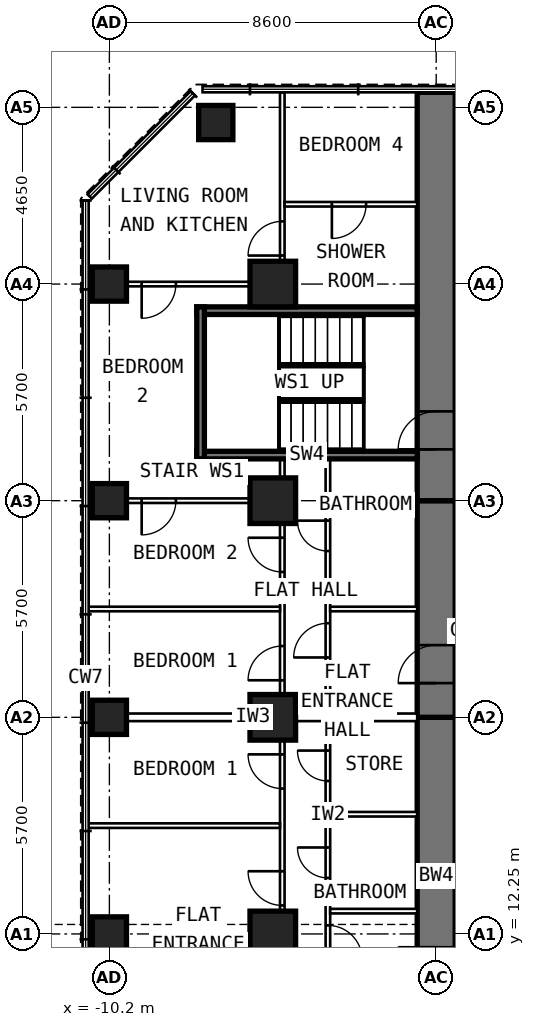
"""IFC4 building model, lengths in metres.
Left out: names, types, materials, properties, quantities, classifications, styles, units other than length and angle.
Written with IfcOpenShell. Run it as: python <this file> out.ifc"""

import sys

from ifc_helpers import new_model, si_unit, direction, frame, frame_2d, origin, origin_2d, place, context, subcontext, project, spatial, rectangle, extrude, element, fill, save


model = new_model("IFC4")
c1 = context("Model", 3, precision=1e-05, world=origin(), true_north=direction((0.0, 1.0)))
c2 = subcontext(c1, "Body", "Model", "MODEL_VIEW")
j1 = project(units=[si_unit("LENGTHUNIT", "METRE"), si_unit("PLANEANGLEUNIT", "RADIAN")], contexts=[c1])
p1 = place(None, origin())
s1 = spatial("IfcSite", under=j1, at=p1, CompositionType="ELEMENT")
p2 = place(p1, origin())
s2 = spatial("IfcBuilding", under=s1, at=p2, CompositionType="ELEMENT")
p3 = place(p2, frame((0.0, 0.0, 75.4)))
s3 = spatial("IfcBuildingStorey", under=s2, at=p3, CompositionType="ELEMENT", Elevation=75.4)
for number, where, z_axis, x_axis in (
    (1, (-10.2, 12.25, 0.0), (0.0, 0.0, 1.0), (0.0, 1.0, 0.0)),
    (2, (-10.2, 17.95, 0.0), (0.0, 0.0, 1.0), (0.0, 1.0, 0.0)),
    (3, (-10.2, 23.65, 0.0), (0.0, 0.0, 1.0), (0.0, 1.0, 0.0)),
    (4, (-10.2, 29.35, 0.0), (0.0, 0.0, 1.0), (0.0, 1.0, 0.0)),
    (5, (-7.4, 33.6, 0.0), (0.0, 0.0, 1.0), (0.0, 1.0, 0.0)),
):
    element("IfcColumn", number, at=place(p3, frame(where, z_axis=z_axis, x_axis=x_axis)), inside=s3, PredefinedType="COLUMN", context=c2, shape_type="SweptSolid", body=[
        extrude(rectangle(XDim=0.9, YDim=0.9, at=origin_2d()), origin(), (0.0, 0.0, 1.0), 5.4),
    ])
for number, where, z_axis, x_axis in (
    (6, (-5.9, 12.25, 0.0), (0.0, 0.0, 1.0), (0.0, 1.0, 0.0)),
    (7, (-5.9, 17.95, 0.0), (0.0, 0.0, 1.0), (0.0, 1.0, 0.0)),
    (8, (-5.9, 23.65, 0.0), (0.0, 0.0, 1.0), (0.0, 1.0, 0.0)),
    (9, (-5.9, 29.35, 0.0), (0.0, 0.0, 1.0), (0.0, 1.0, 0.0)),
):
    element("IfcColumn", number, at=place(p3, frame(where, z_axis=z_axis, x_axis=x_axis)), inside=s3, PredefinedType="COLUMN", context=c2, shape_type="SweptSolid", body=[
        extrude(rectangle(XDim=1.2, YDim=1.2, at=origin_2d()), origin(), (0.0, 0.0, 1.0), 5.4),
    ])
p4 = place(p3, frame((-1.6, 9.6, 0.0), z_axis=(0.0, 0.0, 1.0), x_axis=(0.0, 1.0, 0.0)))
e10 = element("IfcWall", 10, at=p4, inside=s3, PredefinedType="SHEAR", context=c2, shape_type="SweptSolid", body=[
    extrude(rectangle(XDim=8.35, YDim=1.0, at=frame_2d((4.175, 0.0))), origin(), (0.0, 0.0, 1.0), 5.4),
])
p5 = place(p4, frame((1.3, 0.0, 0.0)))
e11 = element("IfcOpeningElement", 11, at=p5, cuts=e10, PredefinedType="OPENING", context=c2, shape_type="SweptSolid", body=[
    extrude(rectangle(XDim=1.0, YDim=2.1, at=frame_2d((0.5, 1.05))), frame((0.0, 0.512, 0.0), z_axis=(0.0, -1.0, 0.0), x_axis=(1.0, 0.0, 0.0)), (0.0, 0.0, 1.0), 1.024),
])
p6 = place(p3, frame((-1.6, 17.95, 0.0), z_axis=(0.0, 0.0, 1.0), x_axis=(0.0, 1.0, 0.0)))
e12 = element("IfcWall", 12, at=p6, inside=s3, PredefinedType="SHEAR", context=c2, shape_type="SweptSolid", body=[
    extrude(rectangle(XDim=5.7, YDim=1.0, at=frame_2d((2.85, 0.0))), origin(), (0.0, 0.0, 1.0), 5.4),
])
p7 = place(p6, frame((0.9, 0.0, 0.0)))
e13 = element("IfcOpeningElement", 13, at=p7, cuts=e12, PredefinedType="OPENING", context=c2, shape_type="SweptSolid", body=[
    extrude(rectangle(XDim=1.0, YDim=2.1, at=frame_2d((0.5, 1.05))), frame((0.0, 0.512, 0.0), z_axis=(0.0, -1.0, 0.0), x_axis=(1.0, 0.0, 0.0)), (0.0, 0.0, 1.0), 1.024),
])
p8 = place(p3, frame((-1.6, 23.65, 0.0), z_axis=(0.0, 0.0, 1.0), x_axis=(0.0, 1.0, 0.0)))
e14 = element("IfcWall", 14, at=p8, inside=s3, PredefinedType="SHEAR", context=c2, shape_type="SweptSolid", body=[
    extrude(rectangle(XDim=10.745, YDim=1.0, at=frame_2d((5.373, 0.0))), origin(), (0.0, 0.0, 1.0), 5.4),
])
p9 = place(p8, frame((1.35, 0.0, 0.0)))
e15 = element("IfcOpeningElement", 15, at=p9, cuts=e14, PredefinedType="OPENING", context=c2, shape_type="SweptSolid", body=[
    extrude(rectangle(XDim=1.0, YDim=2.1, at=frame_2d((0.5, 1.05))), frame((0.0, 0.512, 0.0), z_axis=(0.0, -1.0, 0.0), x_axis=(1.0, 0.0, 0.0)), (0.0, 0.0, 1.0), 1.024),
])
p10 = place(p3, frame((-4.45, 10.1, 0.0), z_axis=(0.0, 0.0, 1.0), x_axis=(0.0, 1.0, 0.0)))
e16 = element("IfcWall", 16, at=p10, inside=s3, PredefinedType="PARTITIONING", context=c2, shape_type="SweptSolid", body=[
    extrude(rectangle(XDim=7.75, YDim=0.12, at=frame_2d((3.875, 0.0))), origin(), (0.0, 0.0, 1.0), 5.15),
])
p11 = place(p10, frame((1.475, 0.0, 0.0)))
e17 = element("IfcOpeningElement", 17, at=p11, cuts=e16, PredefinedType="OPENING", context=c2, shape_type="SweptSolid", body=[
    extrude(rectangle(XDim=0.9, YDim=2.1, at=frame_2d((0.45, 1.05))), frame((0.0, 0.072, 0.0), z_axis=(0.0, -1.0, 0.0), x_axis=(1.0, 0.0, 0.0)), (0.0, 0.0, 1.0), 0.144),
])
p12 = place(p10, frame((3.625, 0.0, 0.0)))
e18 = element("IfcOpeningElement", 18, at=p12, cuts=e16, PredefinedType="OPENING", context=c2, shape_type="SweptSolid", body=[
    extrude(rectangle(XDim=0.8, YDim=2.1, at=frame_2d((0.4, 1.05))), frame((0.0, 0.072, 0.0), z_axis=(0.0, -1.0, 0.0), x_axis=(1.0, 0.0, 0.0)), (0.0, 0.0, 1.0), 0.144),
])
p13 = place(p10, frame((6.175, 0.0, 0.0)))
e19 = element("IfcOpeningElement", 19, at=p13, cuts=e16, PredefinedType="OPENING", context=c2, shape_type="SweptSolid", body=[
    extrude(rectangle(XDim=0.8, YDim=2.1, at=frame_2d((0.4, 1.05))), frame((0.0, 0.072, 0.0), z_axis=(0.0, -1.0, 0.0), x_axis=(1.0, 0.0, 0.0)), (0.0, 0.0, 1.0), 0.144),
])
p14 = place(p3, frame((-5.65, 9.6, 0.0), z_axis=(0.0, 0.0, 1.0), x_axis=(0.0, 1.0, 0.0)))
e20 = element("IfcWall", 20, at=p14, inside=s3, PredefinedType="PARTITIONING", context=c2, shape_type="SweptSolid", body=[
    extrude(rectangle(XDim=8.1, YDim=0.12, at=frame_2d((4.05, 0.0))), origin(), (0.0, 0.0, 1.0), 5.15),
])
p15 = place(p14, frame((3.4, 0.0, 0.0)))
e21 = element("IfcOpeningElement", 21, at=p15, cuts=e20, PredefinedType="OPENING", context=c2, shape_type="SweptSolid", body=[
    extrude(rectangle(XDim=0.9, YDim=2.1, at=frame_2d((0.45, 1.05))), frame((0.0, 0.072, 0.0), z_axis=(0.0, -1.0, 0.0), x_axis=(1.0, 0.0, 0.0)), (0.0, 0.0, 1.0), 0.144),
])
p16 = place(p14, frame((6.475, 0.0, 0.0)))
e22 = element("IfcOpeningElement", 22, at=p16, cuts=e20, PredefinedType="OPENING", context=c2, shape_type="SweptSolid", body=[
    extrude(rectangle(XDim=0.9, YDim=2.1, at=frame_2d((0.45, 1.05))), frame((0.0, 0.072, 0.0), z_axis=(0.0, -1.0, 0.0), x_axis=(1.0, 0.0, 0.0)), (0.0, 0.0, 1.0), 0.144),
])
p17 = place(p3, frame((-5.71, 15.1, 0.0), z_axis=(0.0, 0.0, 1.0), x_axis=(-1.0, 0.0, 0.0)))
e23 = element("IfcWall", 23, at=p17, inside=s3, PredefinedType="PARTITIONING", context=c2, shape_type="SweptSolid", body=[
    extrude(rectangle(XDim=5.035, YDim=0.12, at=frame_2d((2.518, 0.0))), origin(), (0.0, 0.0, 1.0), 5.15),
])
for number, where, z_axis, x_axis in (
    (24, (-2.1, 12.85, 0.0), (0.0, 0.0, 1.0), (-1.0, 0.0, 0.0)),
    (25, (-2.1, 15.4, 0.0), (0.0, 0.0, 1.0), (-1.0, 0.0, 0.0)),
):
    element("IfcWall", number, at=place(p3, frame(where, z_axis=z_axis, x_axis=x_axis)), inside=s3, PredefinedType="PARTITIONING", context=c2, shape_type="SweptSolid", body=[
        extrude(rectangle(XDim=2.29, YDim=0.12, at=frame_2d((1.145, 0.0))), origin(), (0.0, 0.0, 1.0), 5.15),
    ])
p18 = place(p3, frame((-4.45, 18.05, 0.0), z_axis=(0.0, 0.0, 1.0), x_axis=(0.0, 1.0, 0.0)))
e26 = element("IfcWall", 26, at=p18, inside=s3, PredefinedType="PARTITIONING", context=c2, shape_type="SweptSolid", body=[
    extrude(rectangle(XDim=6.7, YDim=0.12, at=frame_2d((3.35, 0.0))), origin(), (0.0, 0.0, 1.0), 5.15),
])
p19 = place(p18, frame((1.475, 0.0, 0.0)))
e27 = element("IfcOpeningElement", 27, at=p19, cuts=e26, PredefinedType="OPENING", context=c2, shape_type="SweptSolid", body=[
    extrude(rectangle(XDim=0.9, YDim=2.1, at=frame_2d((0.45, 1.05))), frame((0.0, 0.072, 0.0), z_axis=(0.0, -1.0, 0.0), x_axis=(1.0, 0.0, 0.0)), (0.0, 0.0, 1.0), 0.144),
])
p20 = place(p18, frame((4.275, 0.0, 0.0)))
e28 = element("IfcOpeningElement", 28, at=p20, cuts=e26, PredefinedType="OPENING", context=c2, shape_type="SweptSolid", body=[
    extrude(rectangle(XDim=0.8, YDim=2.1, at=frame_2d((0.4, 1.05))), frame((0.0, 0.072, 0.0), z_axis=(0.0, -1.0, 0.0), x_axis=(1.0, 0.0, 0.0)), (0.0, 0.0, 1.0), 0.144),
])
p21 = place(p3, frame((-5.65, 18.05, 0.0), z_axis=(0.0, 0.0, 1.0), x_axis=(0.0, 1.0, 0.0)))
e29 = element("IfcWall", 29, at=p21, inside=s3, PredefinedType="PARTITIONING", context=c2, shape_type="SweptSolid", body=[
    extrude(rectangle(XDim=6.7, YDim=0.12, at=frame_2d((3.35, 0.0))), origin(), (0.0, 0.0, 1.0), 5.15),
])
p22 = place(p21, frame((0.875, 0.0, 0.0)))
e30 = element("IfcOpeningElement", 30, at=p22, cuts=e29, PredefinedType="OPENING", context=c2, shape_type="SweptSolid", body=[
    extrude(rectangle(XDim=0.9, YDim=2.1, at=frame_2d((0.45, 1.05))), frame((0.0, 0.072, 0.0), z_axis=(0.0, -1.0, 0.0), x_axis=(1.0, 0.0, 0.0)), (0.0, 0.0, 1.0), 0.144),
])
p23 = place(p21, frame((3.725, 0.0, 0.0)))
e31 = element("IfcOpeningElement", 31, at=p23, cuts=e29, PredefinedType="OPENING", context=c2, shape_type="SweptSolid", body=[
    extrude(rectangle(XDim=0.9, YDim=2.1, at=frame_2d((0.45, 1.05))), frame((0.0, 0.072, 0.0), z_axis=(0.0, -1.0, 0.0), x_axis=(1.0, 0.0, 0.0)), (0.0, 0.0, 1.0), 0.144),
])
p24 = place(p3, frame((-5.71, 20.8, 0.0), z_axis=(0.0, 0.0, 1.0), x_axis=(-1.0, 0.0, 0.0)))
e32 = element("IfcWall", 32, at=p24, inside=s3, PredefinedType="PARTITIONING", context=c2, shape_type="SweptSolid", body=[
    extrude(rectangle(XDim=5.035, YDim=0.12, at=frame_2d((2.518, 0.0))), origin(), (0.0, 0.0, 1.0), 5.15),
])
p25 = place(p3, frame((-2.1, 20.8, 0.0), z_axis=(0.0, 0.0, 1.0), x_axis=(-1.0, 0.0, 0.0)))
e33 = element("IfcWall", 33, at=p25, inside=s3, PredefinedType="PARTITIONING", context=c2, shape_type="SweptSolid", body=[
    extrude(rectangle(XDim=2.29, YDim=0.12, at=frame_2d((1.145, 0.0))), origin(), (0.0, 0.0, 1.0), 5.15),
])
p26 = place(p3, frame((-2.1, 17.95, 0.0), z_axis=(0.0, 0.0, 1.0), x_axis=(-1.0, 0.0, 0.0)))
e34 = element("IfcWall", 34, at=p26, inside=s3, PredefinedType="PARTITIONING", context=c2, shape_type="SweptSolid", body=[
    extrude(rectangle(XDim=8.645, YDim=0.2, at=frame_2d((4.323, 0.0))), origin(), (0.0, 0.0, 1.0), 4.25),
])
p27 = place(p3, frame((-5.71, 23.65, 0.0), z_axis=(0.0, 0.0, 1.0), x_axis=(-1.0, 0.0, 0.0)))
e35 = element("IfcWall", 35, at=p27, inside=s3, PredefinedType="PARTITIONING", context=c2, shape_type="SweptSolid", body=[
    extrude(rectangle(XDim=5.035, YDim=0.12, at=frame_2d((2.518, 0.0))), origin(), (0.0, 0.0, 1.0), 4.25),
])
p28 = place(p27, frame((2.74, 0.0, 0.0)))
e36 = element("IfcOpeningElement", 36, at=p28, cuts=e35, PredefinedType="OPENING", context=c2, shape_type="SweptSolid", body=[
    extrude(rectangle(XDim=0.9, YDim=2.1, at=frame_2d((0.45, 1.05))), frame((0.0, 0.072, 0.0), z_axis=(0.0, -1.0, 0.0), x_axis=(1.0, 0.0, 0.0)), (0.0, 0.0, 1.0), 0.144),
])
p29 = place(p3, frame((-5.71, 29.35, 0.0), z_axis=(0.0, 0.0, 1.0), x_axis=(-1.0, 0.0, 0.0)))
e37 = element("IfcWall", 37, at=p29, inside=s3, PredefinedType="PARTITIONING", context=c2, shape_type="SweptSolid", body=[
    extrude(rectangle(XDim=5.035, YDim=0.12, at=frame_2d((2.518, 0.0))), origin(), (0.0, 0.0, 1.0), 4.25),
])
p30 = place(p29, frame((2.74, 0.0, 0.0)))
e38 = element("IfcOpeningElement", 38, at=p30, cuts=e37, PredefinedType="OPENING", context=c2, shape_type="SweptSolid", body=[
    extrude(rectangle(XDim=0.9, YDim=2.1, at=frame_2d((0.45, 1.05))), frame((0.0, 0.072, 0.0), z_axis=(0.0, -1.0, 0.0), x_axis=(1.0, 0.0, 0.0)), (0.0, 0.0, 1.0), 0.144),
])
p31 = place(p3, frame((-5.65, 28.95, 0.0), z_axis=(0.0, 0.0, 1.0), x_axis=(0.0, 1.0, 0.0)))
e39 = element("IfcWall", 39, at=p31, inside=s3, PredefinedType="PARTITIONING", context=c2, shape_type="SweptSolid", body=[
    extrude(rectangle(XDim=5.445, YDim=0.12, at=frame_2d((2.723, 0.0))), origin(), (0.0, 0.0, 1.0), 5.15),
])
p32 = place(p31, frame((1.15, 0.0, 0.0)))
e40 = element("IfcOpeningElement", 40, at=p32, cuts=e39, PredefinedType="OPENING", context=c2, shape_type="SweptSolid", body=[
    extrude(rectangle(XDim=0.9, YDim=2.1, at=frame_2d((0.45, 1.05))), frame((0.0, 0.072, 0.0), z_axis=(0.0, -1.0, 0.0), x_axis=(1.0, 0.0, 0.0)), (0.0, 0.0, 1.0), 0.144),
])
p33 = place(p3, frame((-2.1, 31.45, 0.0), z_axis=(0.0, 0.0, 1.0), x_axis=(-1.0, 0.0, 0.0)))
e41 = element("IfcWall", 41, at=p33, inside=s3, PredefinedType="PARTITIONING", context=c2, shape_type="SweptSolid", body=[
    extrude(rectangle(XDim=3.49, YDim=0.12, at=frame_2d((1.745, 0.0))), origin(), (0.0, 0.0, 1.0), 5.15),
])
p34 = place(p33, frame((1.345, 0.0, 0.0)))
e42 = element("IfcOpeningElement", 42, at=p34, cuts=e41, PredefinedType="OPENING", context=c2, shape_type="SweptSolid", body=[
    extrude(rectangle(XDim=0.9, YDim=2.1, at=frame_2d((0.45, 1.05))), frame((0.0, 0.072, 0.0), z_axis=(0.0, -1.0, 0.0), x_axis=(1.0, 0.0, 0.0)), (0.0, 0.0, 1.0), 0.144),
])
for number, where, z_axis, x_axis in (
    (43, (-2.1, 24.85, 0.0), (0.0, 0.0, 1.0), (-1.0, 0.0, 0.0)),
    (44, (-2.1, 28.65, 0.0), (0.0, 0.0, 1.0), (-1.0, 0.0, 0.0)),
):
    element("IfcWall", number, at=place(p3, frame(where, z_axis=z_axis, x_axis=x_axis)), inside=s3, PredefinedType="SHEAR", context=c2, shape_type="SweptSolid", body=[
        extrude(rectangle(XDim=5.8, YDim=0.2, at=frame_2d((2.9, 0.0))), origin(), (0.0, 0.0, 1.0), 5.13),
    ])
p35 = place(p3, frame((-7.8, 24.75, 0.0), z_axis=(0.0, 0.0, 1.0), x_axis=(0.0, 1.0, 0.0)))
e45 = element("IfcWall", 45, at=p35, inside=s3, PredefinedType="SHEAR", context=c2, shape_type="SweptSolid", body=[
    extrude(rectangle(XDim=4.0, YDim=0.2, at=frame_2d((2.0, 0.0))), origin(), (0.0, 0.0, 1.0), 5.13),
])
p36 = place(p15, origin())
e46 = element("IfcDoor", 46, at=p36, inside=s3, OperationType="SINGLE_SWING_RIGHT", PredefinedType="DOOR", context=c2, shape_type="SweptSolid", body=[
    extrude(rectangle(XDim=0.9, YDim=2.1, at=frame_2d((0.45, 1.05))), frame((0.0, 0.025, 0.0), z_axis=(0.0, -1.0, 0.0), x_axis=(1.0, 0.0, 0.0)), (0.0, 0.0, 1.0), 0.05),
])
fill(e21, e46)
p37 = place(p16, origin())
e47 = element("IfcDoor", 47, at=p37, inside=s3, OperationType="SINGLE_SWING_RIGHT", PredefinedType="DOOR", context=c2, shape_type="SweptSolid", body=[
    extrude(rectangle(XDim=0.9, YDim=2.1, at=frame_2d((0.45, 1.05))), frame((0.0, 0.025, 0.0), z_axis=(0.0, -1.0, 0.0), x_axis=(1.0, 0.0, 0.0)), (0.0, 0.0, 1.0), 0.05),
])
fill(e22, e47)
p38 = place(p11, frame((0.9, 0.0, 0.0), z_axis=(0.0, 0.0, 1.0), x_axis=(-1.0, 0.0, 0.0)))
e48 = element("IfcDoor", 48, at=p38, inside=s3, OperationType="SINGLE_SWING_RIGHT", PredefinedType="DOOR", context=c2, shape_type="SweptSolid", body=[
    extrude(rectangle(XDim=0.9, YDim=2.1, at=frame_2d((0.45, 1.05))), frame((0.0, 0.025, 0.0), z_axis=(0.0, -1.0, 0.0), x_axis=(1.0, 0.0, 0.0)), (0.0, 0.0, 1.0), 0.05),
])
fill(e17, e48)
p39 = place(p12, origin())
e49 = element("IfcDoor", 49, at=p39, inside=s3, OperationType="SINGLE_SWING_RIGHT", PredefinedType="DOOR", context=c2, shape_type="SweptSolid", body=[
    extrude(rectangle(XDim=0.8, YDim=2.1, at=frame_2d((0.4, 1.05))), frame((0.0, 0.025, 0.0), z_axis=(0.0, -1.0, 0.0), x_axis=(1.0, 0.0, 0.0)), (0.0, 0.0, 1.0), 0.05),
])
fill(e18, e49)
p40 = place(p13, origin())
e50 = element("IfcDoor", 50, at=p40, inside=s3, OperationType="SINGLE_SWING_RIGHT", PredefinedType="DOOR", context=c2, shape_type="SweptSolid", body=[
    extrude(rectangle(XDim=0.8, YDim=2.1, at=frame_2d((0.4, 1.05))), frame((0.0, 0.025, 0.0), z_axis=(0.0, -1.0, 0.0), x_axis=(1.0, 0.0, 0.0)), (0.0, 0.0, 1.0), 0.05),
])
fill(e19, e50)
p41 = place(p7, origin())
e51 = element("IfcDoor", 51, at=p41, inside=s3, OperationType="SINGLE_SWING_LEFT", PredefinedType="DOOR", context=c2, shape_type="SweptSolid", body=[
    extrude(rectangle(XDim=1.0, YDim=2.1, at=frame_2d((0.5, 1.05))), frame((0.0, 0.25, 0.0), z_axis=(0.0, -1.0, 0.0), x_axis=(1.0, 0.0, 0.0)), (0.0, 0.0, 1.0), 0.5),
])
fill(e13, e51)
p42 = place(p22, origin())
e52 = element("IfcDoor", 52, at=p42, inside=s3, OperationType="SINGLE_SWING_LEFT", PredefinedType="DOOR", context=c2, shape_type="SweptSolid", body=[
    extrude(rectangle(XDim=0.9, YDim=2.1, at=frame_2d((0.45, 1.05))), frame((0.0, 0.025, 0.0), z_axis=(0.0, -1.0, 0.0), x_axis=(1.0, 0.0, 0.0)), (0.0, 0.0, 1.0), 0.05),
])
fill(e30, e52)
p43 = place(p23, origin())
e53 = element("IfcDoor", 53, at=p43, inside=s3, OperationType="SINGLE_SWING_RIGHT", PredefinedType="DOOR", context=c2, shape_type="SweptSolid", body=[
    extrude(rectangle(XDim=0.9, YDim=2.1, at=frame_2d((0.45, 1.05))), frame((0.0, 0.025, 0.0), z_axis=(0.0, -1.0, 0.0), x_axis=(1.0, 0.0, 0.0)), (0.0, 0.0, 1.0), 0.05),
])
fill(e31, e53)
p44 = place(p19, origin())
e54 = element("IfcDoor", 54, at=p44, inside=s3, OperationType="SINGLE_SWING_LEFT", PredefinedType="DOOR", context=c2, shape_type="SweptSolid", body=[
    extrude(rectangle(XDim=0.9, YDim=2.1, at=frame_2d((0.45, 1.05))), frame((0.0, 0.025, 0.0), z_axis=(0.0, -1.0, 0.0), x_axis=(1.0, 0.0, 0.0)), (0.0, 0.0, 1.0), 0.05),
])
fill(e27, e54)
p45 = place(p20, origin())
e55 = element("IfcDoor", 55, at=p45, inside=s3, OperationType="SINGLE_SWING_RIGHT", PredefinedType="DOOR", context=c2, shape_type="SweptSolid", body=[
    extrude(rectangle(XDim=0.8, YDim=2.1, at=frame_2d((0.4, 1.05))), frame((0.0, 0.025, 0.0), z_axis=(0.0, -1.0, 0.0), x_axis=(1.0, 0.0, 0.0)), (0.0, 0.0, 1.0), 0.05),
])
fill(e28, e55)
p46 = place(p30, origin())
e56 = element("IfcDoor", 56, at=p46, inside=s3, OperationType="SINGLE_SWING_RIGHT", PredefinedType="DOOR", context=c2, shape_type="SweptSolid", body=[
    extrude(rectangle(XDim=0.9, YDim=2.1, at=frame_2d((0.45, 1.05))), frame((0.0, 0.025, 0.0), z_axis=(0.0, -1.0, 0.0), x_axis=(1.0, 0.0, 0.0)), (0.0, 0.0, 1.0), 0.05),
])
fill(e38, e56)
p47 = place(p32, origin())
e57 = element("IfcDoor", 57, at=p47, inside=s3, OperationType="SINGLE_SWING_LEFT", PredefinedType="DOOR", context=c2, shape_type="SweptSolid", body=[
    extrude(rectangle(XDim=0.9, YDim=2.1, at=frame_2d((0.45, 1.05))), frame((0.0, 0.025, 0.0), z_axis=(0.0, -1.0, 0.0), x_axis=(1.0, 0.0, 0.0)), (0.0, 0.0, 1.0), 0.05),
])
fill(e40, e57)
p48 = place(p34, origin())
e58 = element("IfcDoor", 58, at=p48, inside=s3, OperationType="SINGLE_SWING_RIGHT", PredefinedType="DOOR", context=c2, shape_type="SweptSolid", body=[
    extrude(rectangle(XDim=0.9, YDim=2.1, at=frame_2d((0.45, 1.05))), frame((0.0, 0.025, 0.0), z_axis=(0.0, -1.0, 0.0), x_axis=(1.0, 0.0, 0.0)), (0.0, 0.0, 1.0), 0.05),
])
fill(e42, e58)
p49 = place(p28, origin())
e59 = element("IfcDoor", 59, at=p49, inside=s3, OperationType="SINGLE_SWING_RIGHT", PredefinedType="DOOR", context=c2, shape_type="SweptSolid", body=[
    extrude(rectangle(XDim=0.9, YDim=2.1, at=frame_2d((0.45, 1.05))), frame((0.0, 0.025, 0.0), z_axis=(0.0, -1.0, 0.0), x_axis=(1.0, 0.0, 0.0)), (0.0, 0.0, 1.0), 0.05),
])
fill(e36, e59)
p50 = place(p9, origin())
e60 = element("IfcDoor", 60, at=p50, inside=s3, OperationType="SINGLE_SWING_LEFT", PredefinedType="DOOR", context=c2, shape_type="SweptSolid", body=[
    extrude(rectangle(XDim=1.0, YDim=2.1, at=frame_2d((0.5, 1.05))), frame((0.0, 0.25, 0.0), z_axis=(0.0, -1.0, 0.0), x_axis=(1.0, 0.0, 0.0)), (0.0, 0.0, 1.0), 0.5),
])
fill(e15, e60)
save(model, sys.argv[1])
